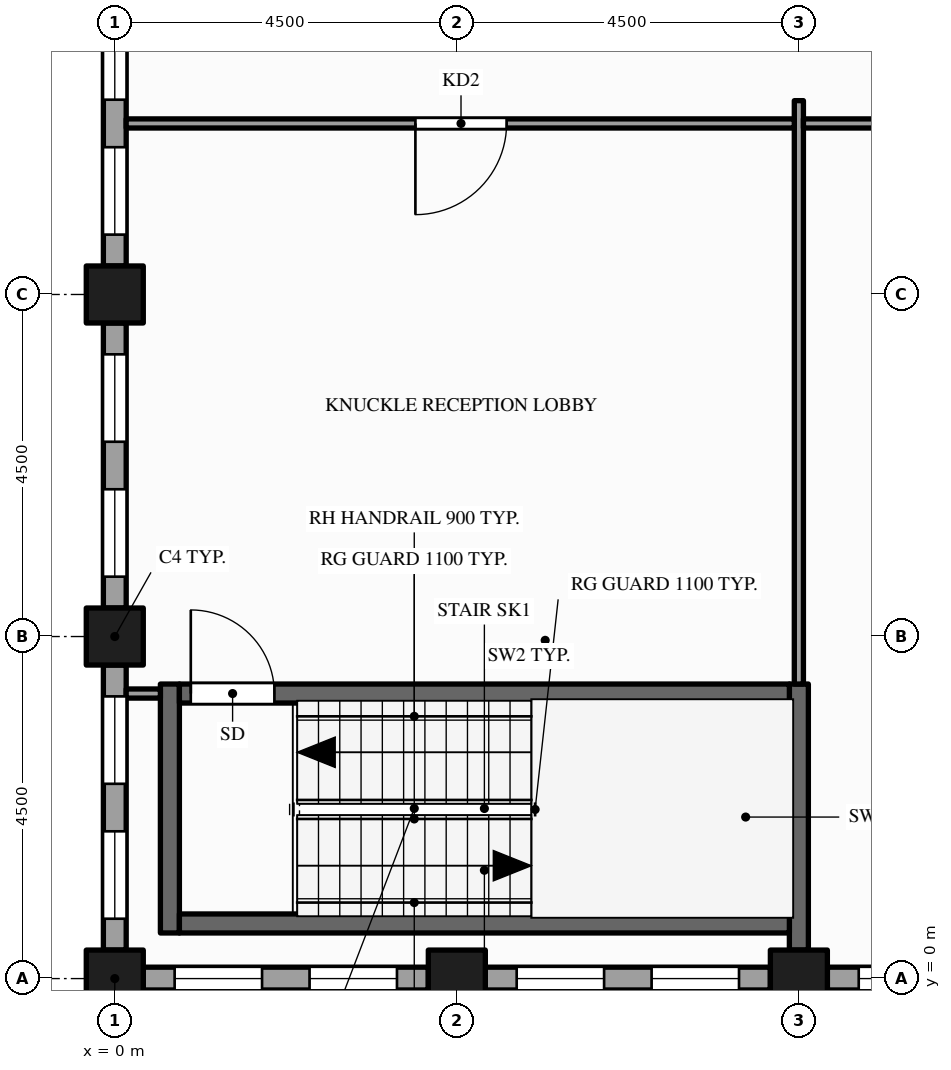
"""IFC4 building model, lengths in metres.
Left out: names, types, materials, properties, quantities, classifications, styles, units other than length and angle.
Written with IfcOpenShell. Run it as: python <this file> out.ifc"""

import sys

from ifc_helpers import new_model, si_unit, direction, frame, frame_2d, origin, origin_2d, place, context, subcontext, project, spatial, rectangle, hollow_rectangle, extrude, element, fill, save


model = new_model("IFC4")
c1 = context("Model", 3, precision=1e-05, world=origin(), true_north=direction((0.0, 1.0)))
c2 = subcontext(c1, "Body", "Model", "MODEL_VIEW")
j1 = project(units=[si_unit("LENGTHUNIT", "METRE"), si_unit("PLANEANGLEUNIT", "RADIAN")], contexts=[c1])
p1 = place(None, origin())
s1 = spatial("IfcSite", under=j1, at=p1, CompositionType="ELEMENT")
p2 = place(p1, origin())
s2 = spatial("IfcBuilding", under=s1, at=p2, CompositionType="ELEMENT")
p3 = place(p2, frame((0.0, 0.0, 211.0)))
s3 = spatial("IfcBuildingStorey", under=s2, at=p3, CompositionType="ELEMENT", Elevation=211.0)
for number, where, z_axis, x_axis in (
    (1, (0.0, 0.0, -0.15), (0.0, 0.0, 1.0), (1.0, 0.0, 0.0)),
    (2, (0.0, 4.5, -0.15), (0.0, 0.0, 1.0), (1.0, 0.0, 0.0)),
    (3, (0.0, 9.0, -0.15), (0.0, 0.0, 1.0), (1.0, 0.0, 0.0)),
    (4, (4.5, 0.0, -0.15), (0.0, 0.0, 1.0), (1.0, 0.0, 0.0)),
    (5, (9.0, 0.0, -0.15), (0.0, 0.0, 1.0), (1.0, 0.0, 0.0)),
):
    element("IfcColumn", number, at=place(p3, frame(where, z_axis=z_axis, x_axis=x_axis)), inside=s3, PredefinedType="COLUMN", context=c2, shape_type="SweptSolid", body=[
        extrude(hollow_rectangle(XDim=0.75, YDim=0.75, WallThickness=0.036, at=origin_2d()), origin(), (0.0, 0.0, 1.0), 4.0),
    ])
p4 = place(p3, frame((0.0, 13.125, 0.0), z_axis=(0.0, 0.0, 1.0), x_axis=(0.0, -1.0, 0.0)))
e6 = element("IfcWall", 6, at=p4, inside=s3, PredefinedType="STANDARD", context=c2, shape_type="SweptSolid", body=[
    extrude(rectangle(XDim=3.75, YDim=0.3, at=frame_2d((1.875, 0.0))), origin(), (0.0, 0.0, 1.0), 3.157),
])
p5 = place(p4, frame((0.413, 0.0, 0.9)))
e7 = element("IfcOpeningElement", 7, at=p5, cuts=e6, PredefinedType="OPENING", context=c2, shape_type="SweptSolid", body=[
    extrude(rectangle(XDim=1.15, YDim=2.0, at=frame_2d((0.575, 1.0))), frame((0.0, 0.16, 0.0), z_axis=(0.0, -1.0, 0.0), x_axis=(1.0, 0.0, 0.0)), (0.0, 0.0, 1.0), 0.32),
])
p6 = place(p4, frame((2.188, 0.0, 0.9)))
e8 = element("IfcOpeningElement", 8, at=p6, cuts=e6, PredefinedType="OPENING", context=c2, shape_type="SweptSolid", body=[
    extrude(rectangle(XDim=1.15, YDim=2.0, at=frame_2d((0.575, 1.0))), frame((0.0, 0.16, 0.0), z_axis=(0.0, -1.0, 0.0), x_axis=(1.0, 0.0, 0.0)), (0.0, 0.0, 1.0), 0.32),
])
p7 = place(p3, frame((0.0, 8.625, 0.0), z_axis=(0.0, 0.0, 1.0), x_axis=(0.0, -1.0, 0.0)))
e9 = element("IfcWall", 9, at=p7, inside=s3, PredefinedType="STANDARD", context=c2, shape_type="SweptSolid", body=[
    extrude(rectangle(XDim=3.75, YDim=0.3, at=frame_2d((1.875, 0.0))), origin(), (0.0, 0.0, 1.0), 3.157),
])
p8 = place(p7, frame((0.413, 0.0, 0.9)))
e10 = element("IfcOpeningElement", 10, at=p8, cuts=e9, PredefinedType="OPENING", context=c2, shape_type="SweptSolid", body=[
    extrude(rectangle(XDim=1.15, YDim=2.0, at=frame_2d((0.575, 1.0))), frame((0.0, 0.16, 0.0), z_axis=(0.0, -1.0, 0.0), x_axis=(1.0, 0.0, 0.0)), (0.0, 0.0, 1.0), 0.32),
])
p9 = place(p7, frame((2.188, 0.0, 0.9)))
e11 = element("IfcOpeningElement", 11, at=p9, cuts=e9, PredefinedType="OPENING", context=c2, shape_type="SweptSolid", body=[
    extrude(rectangle(XDim=1.15, YDim=2.0, at=frame_2d((0.575, 1.0))), frame((0.0, 0.16, 0.0), z_axis=(0.0, -1.0, 0.0), x_axis=(1.0, 0.0, 0.0)), (0.0, 0.0, 1.0), 0.32),
])
p10 = place(p3, frame((0.0, 4.125, 0.0), z_axis=(0.0, 0.0, 1.0), x_axis=(0.0, -1.0, 0.0)))
e12 = element("IfcWall", 12, at=p10, inside=s3, PredefinedType="STANDARD", context=c2, shape_type="SweptSolid", body=[
    extrude(rectangle(XDim=3.75, YDim=0.3, at=frame_2d((1.875, 0.0))), origin(), (0.0, 0.0, 1.0), 3.157),
])
p11 = place(p10, frame((0.413, 0.0, 0.9)))
e13 = element("IfcOpeningElement", 13, at=p11, cuts=e12, PredefinedType="OPENING", context=c2, shape_type="SweptSolid", body=[
    extrude(rectangle(XDim=1.15, YDim=2.0, at=frame_2d((0.575, 1.0))), frame((0.0, 0.16, 0.0), z_axis=(0.0, -1.0, 0.0), x_axis=(1.0, 0.0, 0.0)), (0.0, 0.0, 1.0), 0.32),
])
p12 = place(p10, frame((2.188, 0.0, 0.9)))
e14 = element("IfcOpeningElement", 14, at=p12, cuts=e12, PredefinedType="OPENING", context=c2, shape_type="SweptSolid", body=[
    extrude(rectangle(XDim=1.15, YDim=2.0, at=frame_2d((0.575, 1.0))), frame((0.0, 0.16, 0.0), z_axis=(0.0, -1.0, 0.0), x_axis=(1.0, 0.0, 0.0)), (0.0, 0.0, 1.0), 0.32),
])
p13 = place(p3, frame((0.375, 0.0, 0.0), z_axis=(0.0, 0.0, 1.0), x_axis=(1.0, 0.0, 0.0)))
e15 = element("IfcWall", 15, at=p13, inside=s3, PredefinedType="STANDARD", context=c2, shape_type="SweptSolid", body=[
    extrude(rectangle(XDim=3.75, YDim=0.3, at=frame_2d((1.875, 0.0))), origin(), (0.0, 0.0, 1.0), 3.157),
])
p14 = place(p13, frame((0.413, 0.0, 0.9)))
e16 = element("IfcOpeningElement", 16, at=p14, cuts=e15, PredefinedType="OPENING", context=c2, shape_type="SweptSolid", body=[
    extrude(rectangle(XDim=1.15, YDim=2.0, at=frame_2d((0.575, 1.0))), frame((0.0, 0.16, 0.0), z_axis=(0.0, -1.0, 0.0), x_axis=(1.0, 0.0, 0.0)), (0.0, 0.0, 1.0), 0.32),
])
p15 = place(p13, frame((2.188, 0.0, 0.9)))
e17 = element("IfcOpeningElement", 17, at=p15, cuts=e15, PredefinedType="OPENING", context=c2, shape_type="SweptSolid", body=[
    extrude(rectangle(XDim=1.15, YDim=2.0, at=frame_2d((0.575, 1.0))), frame((0.0, 0.16, 0.0), z_axis=(0.0, -1.0, 0.0), x_axis=(1.0, 0.0, 0.0)), (0.0, 0.0, 1.0), 0.32),
])
p16 = place(p3, frame((4.875, 0.0, 0.0), z_axis=(0.0, 0.0, 1.0), x_axis=(1.0, 0.0, 0.0)))
e18 = element("IfcWall", 18, at=p16, inside=s3, PredefinedType="STANDARD", context=c2, shape_type="SweptSolid", body=[
    extrude(rectangle(XDim=3.75, YDim=0.3, at=frame_2d((1.875, 0.0))), origin(), (0.0, 0.0, 1.0), 3.157),
])
p17 = place(p16, frame((0.413, 0.0, 0.9)))
e19 = element("IfcOpeningElement", 19, at=p17, cuts=e18, PredefinedType="OPENING", context=c2, shape_type="SweptSolid", body=[
    extrude(rectangle(XDim=1.15, YDim=2.0, at=frame_2d((0.575, 1.0))), frame((0.0, 0.16, 0.0), z_axis=(0.0, -1.0, 0.0), x_axis=(1.0, 0.0, 0.0)), (0.0, 0.0, 1.0), 0.32),
])
p18 = place(p16, frame((2.188, 0.0, 0.9)))
e20 = element("IfcOpeningElement", 20, at=p18, cuts=e18, PredefinedType="OPENING", context=c2, shape_type="SweptSolid", body=[
    extrude(rectangle(XDim=1.15, YDim=2.0, at=frame_2d((0.575, 1.0))), frame((0.0, 0.16, 0.0), z_axis=(0.0, -1.0, 0.0), x_axis=(1.0, 0.0, 0.0)), (0.0, 0.0, 1.0), 0.32),
])
p19 = place(p3, frame((9.375, 0.0, 0.0), z_axis=(0.0, 0.0, 1.0), x_axis=(1.0, 0.0, 0.0)))
e21 = element("IfcWall", 21, at=p19, inside=s3, PredefinedType="STANDARD", context=c2, shape_type="SweptSolid", body=[
    extrude(rectangle(XDim=3.75, YDim=0.3, at=frame_2d((1.875, 0.0))), origin(), (0.0, 0.0, 1.0), 2.87),
])
p20 = place(p19, frame((0.413, 0.0, 0.9)))
e22 = element("IfcOpeningElement", 22, at=p20, cuts=e21, PredefinedType="OPENING", context=c2, shape_type="SweptSolid", body=[
    extrude(rectangle(XDim=1.15, YDim=1.75, at=frame_2d((0.575, 0.875))), frame((0.0, 0.16, 0.0), z_axis=(0.0, -1.0, 0.0), x_axis=(1.0, 0.0, 0.0)), (0.0, 0.0, 1.0), 0.32),
])
p21 = place(p19, frame((2.188, 0.0, 0.9)))
e23 = element("IfcOpeningElement", 23, at=p21, cuts=e21, PredefinedType="OPENING", context=c2, shape_type="SweptSolid", body=[
    extrude(rectangle(XDim=1.15, YDim=1.75, at=frame_2d((0.575, 0.875))), frame((0.0, 0.16, 0.0), z_axis=(0.0, -1.0, 0.0), x_axis=(1.0, 0.0, 0.0)), (0.0, 0.0, 1.0), 0.32),
])
p22 = place(p3, frame((0.725, 0.6, 0.0), z_axis=(0.0, 0.0, 1.0), x_axis=(0.0, 1.0, 0.0)))
e24 = element("IfcWall", 24, at=p22, inside=s3, PredefinedType="SHEAR", context=c2, shape_type="SweptSolid", body=[
    extrude(rectangle(XDim=3.275, YDim=0.25, at=frame_2d((1.637, 0.0))), origin(), (0.0, 0.0, 1.0), 3.85),
])
p23 = place(p3, frame((9.0, 0.375, 0.0), z_axis=(0.0, 0.0, 1.0), x_axis=(0.0, 1.0, 0.0)))
e25 = element("IfcWall", 25, at=p23, inside=s3, PredefinedType="SHEAR", context=c2, shape_type="SweptSolid", body=[
    extrude(rectangle(XDim=3.5, YDim=0.25, at=frame_2d((1.75, 0.0))), origin(), (0.0, 0.0, 1.0), 3.85),
])
p24 = place(p3, frame((9.0, 3.875, 0.0), z_axis=(0.0, 0.0, 1.0), x_axis=(0.0, 1.0, 0.0)))
e26 = element("IfcWall", 26, at=p24, inside=s3, PredefinedType="PARTITIONING", context=c2, shape_type="SweptSolid", body=[
    extrude(rectangle(XDim=7.675, YDim=0.12, at=frame_2d((3.837, 0.0))), origin(), (0.0, 0.0, 1.0), 2.87),
])
p25 = place(p3, frame((0.85, 0.725, 0.0), z_axis=(0.0, 0.0, 1.0), x_axis=(1.0, 0.0, 0.0)))
e27 = element("IfcWall", 27, at=p25, inside=s3, PredefinedType="SHEAR", context=c2, shape_type="SweptSolid", body=[
    extrude(rectangle(XDim=8.025, YDim=0.25, at=frame_2d((4.012, 0.0))), origin(), (0.0, 0.0, 1.0), 3.85),
])
p26 = place(p3, frame((0.15, 3.75, 0.0), z_axis=(0.0, 0.0, 1.0), x_axis=(1.0, 0.0, 0.0)))
e28 = element("IfcWall", 28, at=p26, inside=s3, PredefinedType="PARTITIONING", context=c2, shape_type="SweptSolid", body=[
    extrude(rectangle(XDim=0.45, YDim=0.12, at=frame_2d((0.225, 0.0))), origin(), (0.0, 0.0, 1.0), 3.85),
])
p27 = place(p3, frame((0.85, 3.75, 0.0), z_axis=(0.0, 0.0, 1.0), x_axis=(1.0, 0.0, 0.0)))
e29 = element("IfcWall", 29, at=p27, inside=s3, PredefinedType="SHEAR", context=c2, shape_type="SweptSolid", body=[
    extrude(rectangle(XDim=8.025, YDim=0.25, at=frame_2d((4.012, 0.0))), origin(), (0.0, 0.0, 1.0), 3.85),
])
p28 = place(p27, frame((0.15, 0.0, 0.0)))
e30 = element("IfcOpeningElement", 30, at=p28, cuts=e29, PredefinedType="OPENING", context=c2, shape_type="SweptSolid", body=[
    extrude(rectangle(XDim=1.1, YDim=2.1, at=frame_2d((0.55, 1.05))), frame((0.0, 0.135, 0.0), z_axis=(0.0, -1.0, 0.0), x_axis=(1.0, 0.0, 0.0)), (0.0, 0.0, 1.0), 0.27),
])
p29 = place(p3, frame((0.15, 11.25, 0.0), z_axis=(0.0, 0.0, 1.0), x_axis=(1.0, 0.0, 0.0)))
e31 = element("IfcWall", 31, at=p29, inside=s3, PredefinedType="PARTITIONING", context=c2, shape_type="SweptSolid", body=[
    extrude(rectangle(XDim=8.79, YDim=0.12, at=frame_2d((4.395, 0.0))), origin(), (0.0, 0.0, 1.0), 2.87),
])
p30 = place(p29, frame((3.805, 0.0, 0.0)))
e32 = element("IfcOpeningElement", 32, at=p30, cuts=e31, PredefinedType="OPENING", context=c2, shape_type="SweptSolid", body=[
    extrude(rectangle(XDim=1.2, YDim=2.1, at=frame_2d((0.6, 1.05))), frame((0.0, 0.07, 0.0), z_axis=(0.0, -1.0, 0.0), x_axis=(1.0, 0.0, 0.0)), (0.0, 0.0, 1.0), 0.14),
])
p31 = place(p3, frame((9.06, 11.25, 0.0), z_axis=(0.0, 0.0, 1.0), x_axis=(1.0, 0.0, 0.0)))
e33 = element("IfcWall", 33, at=p31, inside=s3, PredefinedType="PARTITIONING", context=c2, shape_type="SweptSolid", body=[
    extrude(rectangle(XDim=4.38, YDim=0.12, at=frame_2d((2.19, 0.0))), origin(), (0.0, 0.0, 1.0), 2.87),
])
p32 = place(p31, frame((1.69, 0.0, 0.0)))
e34 = element("IfcOpeningElement", 34, at=p32, cuts=e33, PredefinedType="OPENING", context=c2, shape_type="SweptSolid", body=[
    extrude(rectangle(XDim=1.0, YDim=2.1, at=frame_2d((0.5, 1.05))), frame((0.0, 0.07, 0.0), z_axis=(0.0, -1.0, 0.0), x_axis=(1.0, 0.0, 0.0)), (0.0, 0.0, 1.0), 0.14),
])
p33 = place(p5, origin())
e35 = element("IfcWindow", 35, at=p33, inside=s3, PartitioningType="SINGLE_PANEL", PredefinedType="WINDOW", context=c2, shape_type="SweptSolid", body=[
    extrude(rectangle(XDim=1.15, YDim=2.0, at=frame_2d((0.575, 1.0))), frame((0.0, 0.03, 0.0), z_axis=(0.0, -1.0, 0.0), x_axis=(1.0, 0.0, 0.0)), (0.0, 0.0, 1.0), 0.06),
])
fill(e7, e35)
p34 = place(p6, origin())
e36 = element("IfcWindow", 36, at=p34, inside=s3, PartitioningType="SINGLE_PANEL", PredefinedType="WINDOW", context=c2, shape_type="SweptSolid", body=[
    extrude(rectangle(XDim=1.15, YDim=2.0, at=frame_2d((0.575, 1.0))), frame((0.0, 0.03, 0.0), z_axis=(0.0, -1.0, 0.0), x_axis=(1.0, 0.0, 0.0)), (0.0, 0.0, 1.0), 0.06),
])
fill(e8, e36)
p35 = place(p8, origin())
e37 = element("IfcWindow", 37, at=p35, inside=s3, PartitioningType="SINGLE_PANEL", PredefinedType="WINDOW", context=c2, shape_type="SweptSolid", body=[
    extrude(rectangle(XDim=1.15, YDim=2.0, at=frame_2d((0.575, 1.0))), frame((0.0, 0.03, 0.0), z_axis=(0.0, -1.0, 0.0), x_axis=(1.0, 0.0, 0.0)), (0.0, 0.0, 1.0), 0.06),
])
fill(e10, e37)
p36 = place(p9, origin())
e38 = element("IfcWindow", 38, at=p36, inside=s3, PartitioningType="SINGLE_PANEL", PredefinedType="WINDOW", context=c2, shape_type="SweptSolid", body=[
    extrude(rectangle(XDim=1.15, YDim=2.0, at=frame_2d((0.575, 1.0))), frame((0.0, 0.03, 0.0), z_axis=(0.0, -1.0, 0.0), x_axis=(1.0, 0.0, 0.0)), (0.0, 0.0, 1.0), 0.06),
])
fill(e11, e38)
p37 = place(p11, origin())
e39 = element("IfcWindow", 39, at=p37, inside=s3, PartitioningType="SINGLE_PANEL", PredefinedType="WINDOW", context=c2, shape_type="SweptSolid", body=[
    extrude(rectangle(XDim=1.15, YDim=2.0, at=frame_2d((0.575, 1.0))), frame((0.0, 0.03, 0.0), z_axis=(0.0, -1.0, 0.0), x_axis=(1.0, 0.0, 0.0)), (0.0, 0.0, 1.0), 0.06),
])
fill(e13, e39)
p38 = place(p12, origin())
e40 = element("IfcWindow", 40, at=p38, inside=s3, PartitioningType="SINGLE_PANEL", PredefinedType="WINDOW", context=c2, shape_type="SweptSolid", body=[
    extrude(rectangle(XDim=1.15, YDim=2.0, at=frame_2d((0.575, 1.0))), frame((0.0, 0.03, 0.0), z_axis=(0.0, -1.0, 0.0), x_axis=(1.0, 0.0, 0.0)), (0.0, 0.0, 1.0), 0.06),
])
fill(e14, e40)
p39 = place(p14, origin())
e41 = element("IfcWindow", 41, at=p39, inside=s3, PartitioningType="SINGLE_PANEL", PredefinedType="WINDOW", context=c2, shape_type="SweptSolid", body=[
    extrude(rectangle(XDim=1.15, YDim=2.0, at=frame_2d((0.575, 1.0))), frame((0.0, 0.03, 0.0), z_axis=(0.0, -1.0, 0.0), x_axis=(1.0, 0.0, 0.0)), (0.0, 0.0, 1.0), 0.06),
])
fill(e16, e41)
p40 = place(p15, origin())
e42 = element("IfcWindow", 42, at=p40, inside=s3, PartitioningType="SINGLE_PANEL", PredefinedType="WINDOW", context=c2, shape_type="SweptSolid", body=[
    extrude(rectangle(XDim=1.15, YDim=2.0, at=frame_2d((0.575, 1.0))), frame((0.0, 0.03, 0.0), z_axis=(0.0, -1.0, 0.0), x_axis=(1.0, 0.0, 0.0)), (0.0, 0.0, 1.0), 0.06),
])
fill(e17, e42)
p41 = place(p17, origin())
e43 = element("IfcWindow", 43, at=p41, inside=s3, PartitioningType="SINGLE_PANEL", PredefinedType="WINDOW", context=c2, shape_type="SweptSolid", body=[
    extrude(rectangle(XDim=1.15, YDim=2.0, at=frame_2d((0.575, 1.0))), frame((0.0, 0.03, 0.0), z_axis=(0.0, -1.0, 0.0), x_axis=(1.0, 0.0, 0.0)), (0.0, 0.0, 1.0), 0.06),
])
fill(e19, e43)
p42 = place(p18, origin())
e44 = element("IfcWindow", 44, at=p42, inside=s3, PartitioningType="SINGLE_PANEL", PredefinedType="WINDOW", context=c2, shape_type="SweptSolid", body=[
    extrude(rectangle(XDim=1.15, YDim=2.0, at=frame_2d((0.575, 1.0))), frame((0.0, 0.03, 0.0), z_axis=(0.0, -1.0, 0.0), x_axis=(1.0, 0.0, 0.0)), (0.0, 0.0, 1.0), 0.06),
])
fill(e20, e44)
p43 = place(p20, origin())
e45 = element("IfcWindow", 45, at=p43, inside=s3, PartitioningType="SINGLE_PANEL", PredefinedType="WINDOW", context=c2, shape_type="SweptSolid", body=[
    extrude(rectangle(XDim=1.15, YDim=1.75, at=frame_2d((0.575, 0.875))), frame((0.0, 0.03, 0.0), z_axis=(0.0, -1.0, 0.0), x_axis=(1.0, 0.0, 0.0)), (0.0, 0.0, 1.0), 0.06),
])
fill(e22, e45)
p44 = place(p28, origin())
e46 = element("IfcDoor", 46, at=p44, inside=s3, OperationType="SINGLE_SWING_LEFT", PredefinedType="DOOR", context=c2, shape_type="SweptSolid", body=[
    extrude(rectangle(XDim=1.1, YDim=2.1, at=frame_2d((0.55, 1.05))), frame((0.0, 0.025, 0.0), z_axis=(0.0, -1.0, 0.0), x_axis=(1.0, 0.0, 0.0)), (0.0, 0.0, 1.0), 0.05),
])
fill(e30, e46)
p45 = place(p30, origin())
e47 = element("IfcDoor", 47, at=p45, inside=s3, OperationType="SINGLE_SWING_LEFT", PredefinedType="DOOR", context=c2, shape_type="SweptSolid", body=[
    extrude(rectangle(XDim=1.2, YDim=2.1, at=frame_2d((0.6, 1.05))), frame((0.0, 0.025, 0.0), z_axis=(0.0, -1.0, 0.0), x_axis=(1.0, 0.0, 0.0)), (0.0, 0.0, 1.0), 0.05),
])
fill(e32, e47)
save(model, sys.argv[1])
